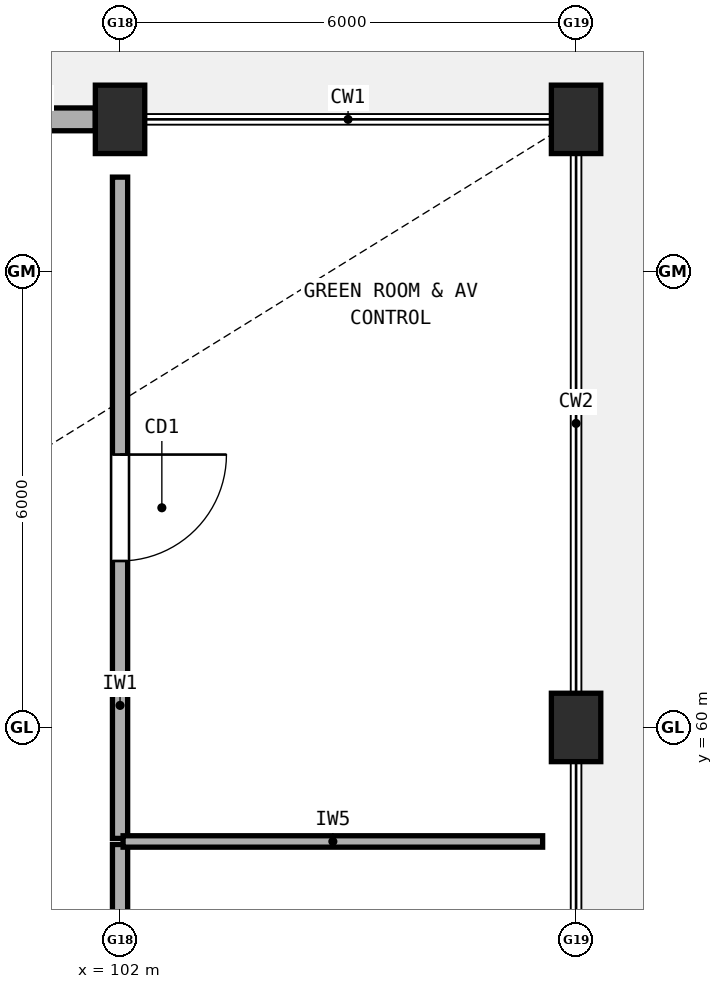
"""IFC4 building model, lengths in metres.
Left out: names, types, materials, properties, quantities, classifications, styles, units other than length and angle.
Written with IfcOpenShell. Run it as: python <this file> out.ifc"""

import sys

from ifc_helpers import new_model, si_unit, direction, frame, frame_2d, origin, origin_2d, place, context, subcontext, project, spatial, rectangle, extrude, element, fill, save


model = new_model("IFC4")
c1 = context("Model", 3, precision=1e-05, world=origin(), true_north=direction((0.0, 1.0)))
c2 = subcontext(c1, "Body", "Model", "MODEL_VIEW")
j1 = project(units=[si_unit("LENGTHUNIT", "METRE"), si_unit("PLANEANGLEUNIT", "RADIAN")], contexts=[c1])
p1 = place(None, origin())
s1 = spatial("IfcSite", under=j1, at=p1, CompositionType="ELEMENT")
p2 = place(p1, origin())
s2 = spatial("IfcBuilding", under=s1, at=p2, CompositionType="ELEMENT")
p3 = place(p2, origin())
s3 = spatial("IfcBuildingStorey", under=s2, at=p3, CompositionType="ELEMENT", Elevation=0.0)
for number, where, z_axis, x_axis in (
    (1, (102.0, 68.0, 0.0), (0.0, 0.0, 1.0), (1.0, 0.0, 0.0)),
    (2, (108.0, 60.0, 0.0), (0.0, 0.0, 1.0), (1.0, 0.0, 0.0)),
    (3, (108.0, 68.0, 0.0), (0.0, 0.0, 1.0), (1.0, 0.0, 0.0)),
):
    element("IfcColumn", number, at=place(p3, frame(where, z_axis=z_axis, x_axis=x_axis)), inside=s3, PredefinedType="COLUMN", context=c2, shape_type="SweptSolid", body=[
        extrude(rectangle(XDim=0.65, YDim=0.9, at=origin_2d()), origin(), (0.0, 0.0, 1.0), 4.5),
    ])
p4 = place(p3, frame((101.675, 68.0, 0.0), z_axis=(0.0, 0.0, 1.0), x_axis=(-1.0, 0.0, 0.0)))
e4 = element("IfcWall", 4, at=p4, inside=s3, PredefinedType="STANDARD", context=c2, shape_type="SweptSolid", body=[
    extrude(rectangle(XDim=5.35, YDim=0.3, at=frame_2d((2.675, 0.0))), origin(), (0.0, 0.0, 1.0), 3.562),
])
p5 = place(p4, frame((1.775, 0.0, 0.0)))
e5 = element("IfcOpeningElement", 5, at=p5, cuts=e4, PredefinedType="OPENING", context=c2, shape_type="SweptSolid", body=[
    extrude(rectangle(XDim=1.8, YDim=2.2, at=frame_2d((0.9, 1.1))), frame((0.0, 0.16, 0.0), z_axis=(0.0, -1.0, 0.0), x_axis=(1.0, 0.0, 0.0)), (0.0, 0.0, 1.0), 0.32),
])
p6 = place(p3, frame((102.0, 42.76, 0.0), z_axis=(0.0, 0.0, 1.0), x_axis=(0.0, 1.0, 0.0)))
e6 = element("IfcWall", 6, at=p6, inside=s3, PredefinedType="SOLIDWALL", context=c2, shape_type="SweptSolid", body=[
    extrude(rectangle(XDim=15.7, YDim=0.2, at=frame_2d((7.85, 0.0))), origin(), (0.0, 0.0, 1.0), 4.23),
])
p7 = place(p6, frame((7.2, 0.0, 0.0)))
e7 = element("IfcOpeningElement", 7, at=p7, cuts=e6, PredefinedType="OPENING", context=c2, shape_type="SweptSolid", body=[
    extrude(rectangle(XDim=1.3, YDim=2.15, at=frame_2d((0.65, 1.075))), frame((0.0, 0.11, 0.0), z_axis=(0.0, -1.0, 0.0), x_axis=(1.0, 0.0, 0.0)), (0.0, 0.0, 1.0), 0.22),
])
p8 = place(p3, frame((102.0, 58.54, 0.0), z_axis=(0.0, 0.0, 1.0), x_axis=(0.0, 1.0, 0.0)))
e8 = element("IfcWall", 8, at=p8, inside=s3, PredefinedType="SOLIDWALL", context=c2, shape_type="SweptSolid", body=[
    extrude(rectangle(XDim=8.7, YDim=0.2, at=frame_2d((4.35, 0.0))), origin(), (0.0, 0.0, 1.0), 4.23),
])
p9 = place(p8, frame((3.65, 0.0, 0.0)))
e9 = element("IfcOpeningElement", 9, at=p9, cuts=e8, PredefinedType="OPENING", context=c2, shape_type="SweptSolid", body=[
    extrude(rectangle(XDim=1.4, YDim=2.15, at=frame_2d((0.7, 1.075))), frame((0.0, 0.11, 0.0), z_axis=(0.0, -1.0, 0.0), x_axis=(1.0, 0.0, 0.0)), (0.0, 0.0, 1.0), 0.22),
])
p10 = place(p3, frame((102.04, 58.5, 0.0), z_axis=(0.0, 0.0, 1.0), x_axis=(1.0, 0.0, 0.0)))
e10 = element("IfcWall", 10, at=p10, inside=s3, PredefinedType="PARTITIONING", context=c2, shape_type="SweptSolid", body=[
    extrude(rectangle(XDim=5.52, YDim=0.15, at=frame_2d((2.76, 0.0))), origin(), (0.0, 0.0, 1.0), 4.23),
])
p11 = place(p9, origin())
e11 = element("IfcDoor", 11, at=p11, inside=s3, OperationType="SINGLE_SWING_RIGHT", PredefinedType="DOOR", context=c2, shape_type="SweptSolid", body=[
    extrude(rectangle(XDim=1.4, YDim=2.15, at=frame_2d((0.7, 1.075))), frame((0.0, 0.025, 0.0), z_axis=(0.0, -1.0, 0.0), x_axis=(1.0, 0.0, 0.0)), (0.0, 0.0, 1.0), 0.05),
])
fill(e9, e11)
save(model, sys.argv[1])
